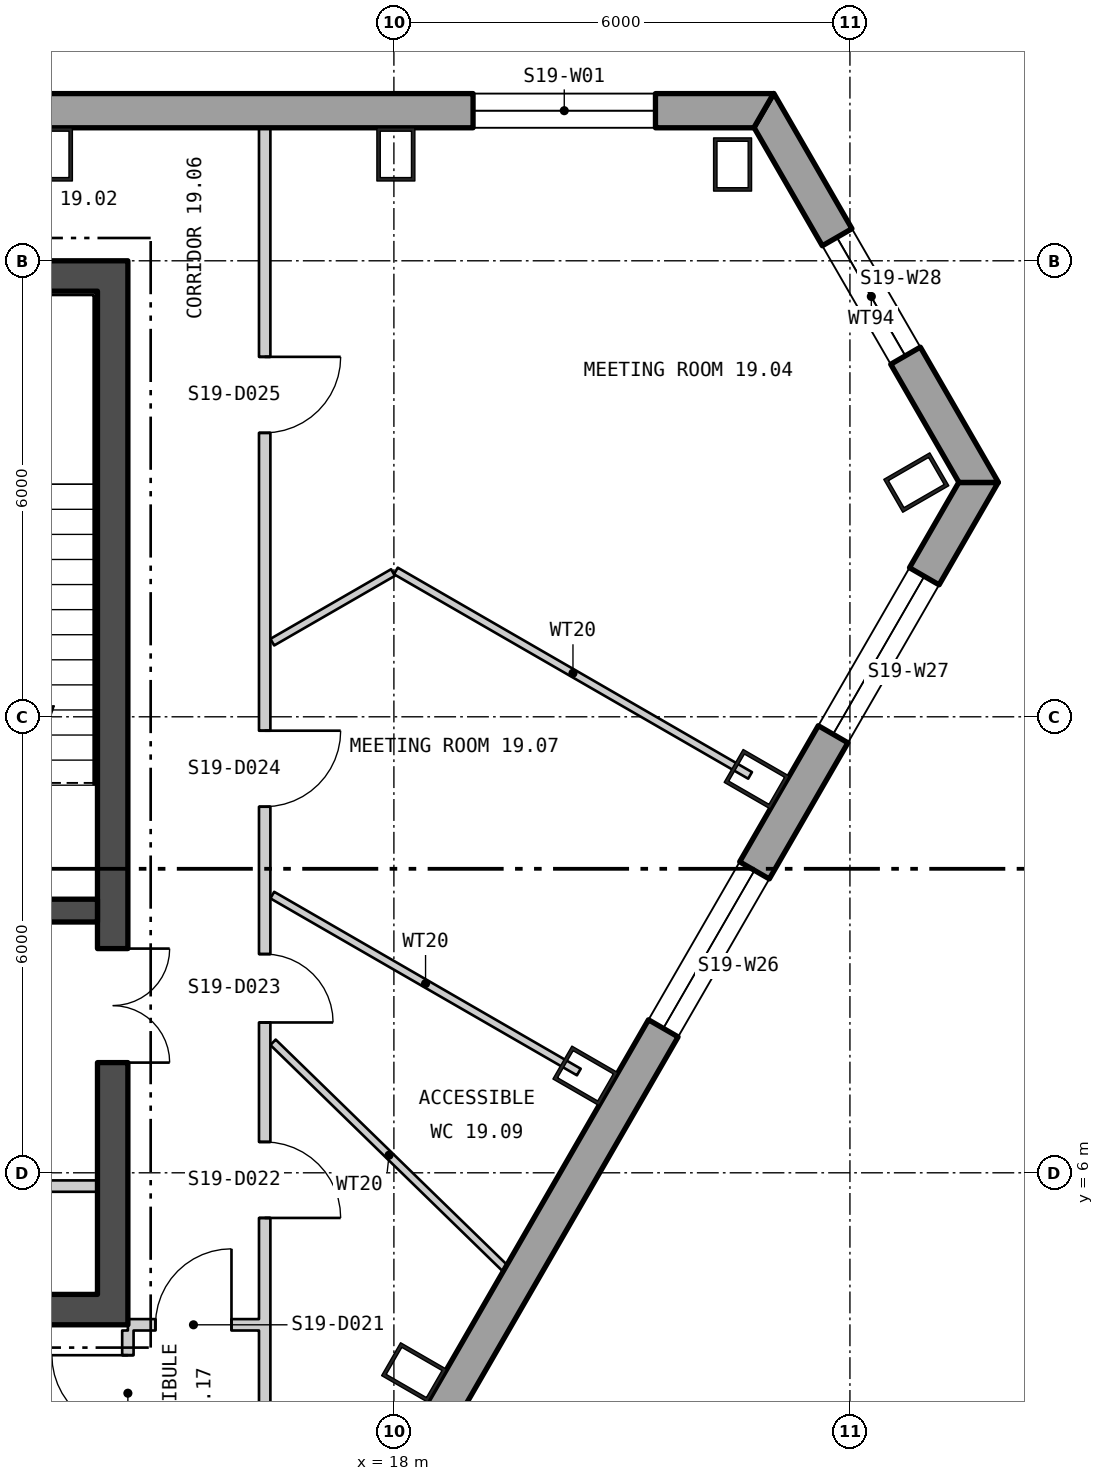
"""IFC4 building model, lengths in metres.
Left out: names, types, materials, properties, quantities, classifications, styles, units other than length and angle.
Written with IfcOpenShell. Run it as: python <this file> out.ifc"""

import sys

from ifc_helpers import new_model, si_unit, direction, frame, frame_2d, origin, origin_2d, place, context, subcontext, project, spatial, polyline, rectangle, hollow_rectangle, outline, extrude, element, fill, save


model = new_model("IFC4")
c1 = context("Model", 3, precision=1e-05, world=origin(), true_north=direction((0.0, 1.0)))
c2 = subcontext(c1, "Body", "Model", "MODEL_VIEW")
j1 = project(units=[si_unit("LENGTHUNIT", "METRE"), si_unit("PLANEANGLEUNIT", "RADIAN")], contexts=[c1])
p1 = place(None, origin())
s1 = spatial("IfcSite", under=j1, at=p1, CompositionType="ELEMENT")
p2 = place(p1, origin())
s2 = spatial("IfcBuilding", under=s1, at=p2, CompositionType="ELEMENT")
p3 = place(p2, frame((0.0, 0.0, 257.1)))
s3 = spatial("IfcBuildingStorey", under=s2, at=p3, CompositionType="ELEMENT", Elevation=257.1)
for number, where, z_axis, x_axis in (
    (1, (22.456, 19.267, 0.0), (0.0, 0.0, 1.0), (-1.0, 0.0, 0.0)),
    (2, (18.026, 19.4, 0.0), (0.0, 0.0, 1.0), (-1.0, 0.0, 0.0)),
    (3, (13.52, 19.4, 0.0), (0.0, 0.0, 1.0), (-1.0, 0.0, 0.0)),
    (4, (18.266, 3.373, 0.0), (0.0, 0.0, 1.0), (0.5, 0.866, 0.0)),
    (5, (20.52, 7.276, 0.0), (0.0, 0.0, 1.0), (0.5, 0.866, 0.0)),
    (6, (22.773, 11.179, 0.0), (0.0, 0.0, 1.0), (0.5, 0.866, 0.0)),
    (7, (24.873, 15.082, 0.0), (0.0, 0.0, 1.0), (-0.5, 0.866, 0.0)),
):
    element("IfcColumn", number, at=place(p3, frame(where, z_axis=z_axis, x_axis=x_axis)), inside=s3, PredefinedType="COLUMN", context=c2, shape_type="SweptSolid", body=[
        extrude(hollow_rectangle(XDim=0.5, YDim=0.7, WallThickness=0.045, at=origin_2d()), origin(), (0.0, 0.0, 1.0), 3.9),
    ])
p4 = place(p3, frame((22.865, 19.975, -0.4), z_axis=(0.0, 0.0, 1.0), x_axis=(-1.0, 0.0, 0.0)))
e8 = element("IfcWall", 8, at=p4, inside=s3, PredefinedType="SOLIDWALL", context=c2, shape_type="SweptSolid", body=[
    extrude(outline(polyline([(-0.13, -0.225), (45.86, -0.225), (45.6, 0.225), (0.13, 0.225), (-0.13, -0.225)])), origin(), (0.0, 0.0, 1.0), 3.9),
])
p5 = place(p4, frame((1.424, 0.0, 1.3)))
e9 = element("IfcOpeningElement", 9, at=p5, cuts=e8, PredefinedType="OPENING", context=c2, shape_type="SweptSolid", body=[
    extrude(rectangle(XDim=2.4, YDim=2.0, at=frame_2d((1.2, 1.0))), frame((0.0, 0.235, 0.0), z_axis=(0.0, -1.0, 0.0), x_axis=(1.0, 0.0, 0.0)), (0.0, 0.0, 1.0), 0.47),
])
p6 = place(p4, frame((14.905, 0.0, 1.3)))
e10 = element("IfcOpeningElement", 10, at=p6, cuts=e8, PredefinedType="OPENING", context=c2, shape_type="SweptSolid", body=[
    extrude(rectangle(XDim=2.4, YDim=2.0, at=frame_2d((1.2, 1.0))), frame((0.0, 0.235, 0.0), z_axis=(0.0, -1.0, 0.0), x_axis=(1.0, 0.0, 0.0)), (0.0, 0.0, 1.0), 0.47),
])
p7 = place(p4, frame((19.412, 0.0, 1.3)))
e11 = element("IfcOpeningElement", 11, at=p7, cuts=e8, PredefinedType="OPENING", context=c2, shape_type="SweptSolid", body=[
    extrude(rectangle(XDim=2.4, YDim=2.0, at=frame_2d((1.2, 1.0))), frame((0.0, 0.235, 0.0), z_axis=(0.0, -1.0, 0.0), x_axis=(1.0, 0.0, 0.0)), (0.0, 0.0, 1.0), 0.47),
])
p8 = place(p4, frame((23.918, 0.0, 1.3)))
e12 = element("IfcOpeningElement", 12, at=p8, cuts=e8, PredefinedType="OPENING", context=c2, shape_type="SweptSolid", body=[
    extrude(rectangle(XDim=2.4, YDim=2.0, at=frame_2d((1.2, 1.0))), frame((0.0, 0.235, 0.0), z_axis=(0.0, -1.0, 0.0), x_axis=(1.0, 0.0, 0.0)), (0.0, 0.0, 1.0), 0.47),
])
p9 = place(p4, frame((28.425, 0.0, 1.3)))
e13 = element("IfcOpeningElement", 13, at=p9, cuts=e8, PredefinedType="OPENING", context=c2, shape_type="SweptSolid", body=[
    extrude(rectangle(XDim=2.4, YDim=2.0, at=frame_2d((1.2, 1.0))), frame((0.0, 0.235, 0.0), z_axis=(0.0, -1.0, 0.0), x_axis=(1.0, 0.0, 0.0)), (0.0, 0.0, 1.0), 0.47),
])
p10 = place(p4, frame((32.932, 0.0, 1.3)))
e14 = element("IfcOpeningElement", 14, at=p10, cuts=e8, PredefinedType="OPENING", context=c2, shape_type="SweptSolid", body=[
    extrude(rectangle(XDim=2.4, YDim=2.0, at=frame_2d((1.2, 1.0))), frame((0.0, 0.235, 0.0), z_axis=(0.0, -1.0, 0.0), x_axis=(1.0, 0.0, 0.0)), (0.0, 0.0, 1.0), 0.47),
])
p11 = place(p4, frame((41.907, 0.0, 1.3)))
e15 = element("IfcOpeningElement", 15, at=p11, cuts=e8, PredefinedType="OPENING", context=c2, shape_type="SweptSolid", body=[
    extrude(rectangle(XDim=2.4, YDim=2.0, at=frame_2d((1.2, 1.0))), frame((0.0, 0.235, 0.0), z_axis=(0.0, -1.0, 0.0), x_axis=(1.0, 0.0, 0.0)), (0.0, 0.0, 1.0), 0.47),
])
p12 = place(p3, frame((2.825, -24.522, -0.18), z_axis=(0.0, 0.0, 1.0), x_axis=(0.500000141277, 0.866025322218, 0.0)))
e16 = element("IfcWall", 16, at=p12, inside=s3, PredefinedType="SOLIDWALL", context=c2, shape_type="SweptSolid", body=[
    extrude(outline(polyline([(-0.13, -0.225), (45.86, -0.225), (45.6, 0.225), (0.13, 0.225), (-0.13, -0.225)])), origin(), (0.0, 0.0, 1.0), 3.68),
])
p13 = place(p12, frame((1.424, 0.0, 1.08)))
e17 = element("IfcOpeningElement", 17, at=p13, cuts=e16, PredefinedType="OPENING", context=c2, shape_type="SweptSolid", body=[
    extrude(rectangle(XDim=2.4, YDim=2.0, at=frame_2d((1.2, 1.0))), frame((0.0, 0.235, 0.0), z_axis=(0.0, -1.0, 0.0), x_axis=(1.0, 0.0, 0.0)), (0.0, 0.0, 1.0), 0.47),
])
p14 = place(p12, frame((5.892, 0.0, 1.08)))
e18 = element("IfcOpeningElement", 18, at=p14, cuts=e16, PredefinedType="OPENING", context=c2, shape_type="SweptSolid", body=[
    extrude(rectangle(XDim=2.4, YDim=2.0, at=frame_2d((1.2, 1.0))), frame((0.0, 0.235, 0.0), z_axis=(0.0, -1.0, 0.0), x_axis=(1.0, 0.0, 0.0)), (0.0, 0.0, 1.0), 0.47),
])
p15 = place(p12, frame((10.399, 0.0, 1.08)))
e19 = element("IfcOpeningElement", 19, at=p15, cuts=e16, PredefinedType="OPENING", context=c2, shape_type="SweptSolid", body=[
    extrude(rectangle(XDim=2.4, YDim=2.0, at=frame_2d((1.2, 1.0))), frame((0.0, 0.235, 0.0), z_axis=(0.0, -1.0, 0.0), x_axis=(1.0, 0.0, 0.0)), (0.0, 0.0, 1.0), 0.47),
])
p16 = place(p12, frame((14.905, 0.0, 1.08)))
e20 = element("IfcOpeningElement", 20, at=p16, cuts=e16, PredefinedType="OPENING", context=c2, shape_type="SweptSolid", body=[
    extrude(rectangle(XDim=2.4, YDim=2.0, at=frame_2d((1.2, 1.0))), frame((0.0, 0.235, 0.0), z_axis=(0.0, -1.0, 0.0), x_axis=(1.0, 0.0, 0.0)), (0.0, 0.0, 1.0), 0.47),
])
p17 = place(p12, frame((19.412, 0.0, 1.08)))
e21 = element("IfcOpeningElement", 21, at=p17, cuts=e16, PredefinedType="OPENING", context=c2, shape_type="SweptSolid", body=[
    extrude(rectangle(XDim=2.4, YDim=2.0, at=frame_2d((1.2, 1.0))), frame((0.0, 0.235, 0.0), z_axis=(0.0, -1.0, 0.0), x_axis=(1.0, 0.0, 0.0)), (0.0, 0.0, 1.0), 0.47),
])
p18 = place(p12, frame((28.425, 0.0, 1.08)))
e22 = element("IfcOpeningElement", 22, at=p18, cuts=e16, PredefinedType="OPENING", context=c2, shape_type="SweptSolid", body=[
    extrude(rectangle(XDim=2.4, YDim=2.0, at=frame_2d((1.2, 1.0))), frame((0.0, 0.235, 0.0), z_axis=(0.0, -1.0, 0.0), x_axis=(1.0, 0.0, 0.0)), (0.0, 0.0, 1.0), 0.47),
])
p19 = place(p12, frame((37.438, 0.0, 1.08)))
e23 = element("IfcOpeningElement", 23, at=p19, cuts=e16, PredefinedType="OPENING", context=c2, shape_type="SweptSolid", body=[
    extrude(rectangle(XDim=2.4, YDim=2.0, at=frame_2d((1.2, 1.0))), frame((0.0, 0.235, 0.0), z_axis=(0.0, -1.0, 0.0), x_axis=(1.0, 0.0, 0.0)), (0.0, 0.0, 1.0), 0.47),
])
p20 = place(p12, frame((41.907, 0.0, 1.08)))
e24 = element("IfcOpeningElement", 24, at=p20, cuts=e16, PredefinedType="OPENING", context=c2, shape_type="SweptSolid", body=[
    extrude(rectangle(XDim=2.4, YDim=2.0, at=frame_2d((1.2, 1.0))), frame((0.0, 0.235, 0.0), z_axis=(0.0, -1.0, 0.0), x_axis=(1.0, 0.0, 0.0)), (0.0, 0.0, 1.0), 0.47),
])
p21 = place(p3, frame((25.694, 15.084, -0.4), z_axis=(0.0, 0.0, 1.0), x_axis=(-0.50000128263, 0.866024663256, 0.0)))
e25 = element("IfcWall", 25, at=p21, inside=s3, PredefinedType="SOLIDWALL", context=c2, shape_type="SweptSolid", body=[
    extrude(outline(polyline([(-0.13, -0.225), (5.78, -0.225), (5.52, 0.225), (0.13, 0.225), (-0.13, -0.225)])), origin(), (0.0, 0.0, 1.0), 3.9),
])
p22 = place(p21, frame((1.925, 0.0, 1.3)))
e26 = element("IfcOpeningElement", 26, at=p22, cuts=e25, PredefinedType="OPENING", context=c2, shape_type="SweptSolid", body=[
    extrude(rectangle(XDim=1.8, YDim=2.0, at=frame_2d((0.9, 1.0))), frame((0.0, 0.235, 0.0), z_axis=(0.0, -1.0, 0.0), x_axis=(1.0, 0.0, 0.0)), (0.0, 0.0, 1.0), 0.47),
])
p23 = place(p3, frame((-14.5, 4.2, 0.0), z_axis=(0.0, 0.0, 1.0), x_axis=(1.0, 0.0, 0.0)))
e27 = element("IfcWall", 27, at=p23, inside=s3, PredefinedType="SHEAR", context=c2, shape_type="SweptSolid", body=[
    extrude(rectangle(XDim=29.0, YDim=0.4, at=frame_2d((14.5, 0.0))), origin(), (0.0, 0.0, 1.0), 3.7),
])
p24 = place(p23, frame((9.0, 0.0, 0.0)))
e28 = element("IfcOpeningElement", 28, at=p24, cuts=e27, PredefinedType="OPENING", context=c2, shape_type="SweptSolid", body=[
    extrude(rectangle(XDim=1.8, YDim=2.4, at=frame_2d((0.9, 1.2))), frame((0.0, 0.21, 0.0), z_axis=(0.0, -1.0, 0.0), x_axis=(1.0, 0.0, 0.0)), (0.0, 0.0, 1.0), 0.42),
])
p25 = place(p23, frame((19.0, 0.0, 0.0)))
e29 = element("IfcOpeningElement", 29, at=p25, cuts=e27, PredefinedType="OPENING", context=c2, shape_type="SweptSolid", body=[
    extrude(rectangle(XDim=1.8, YDim=2.4, at=frame_2d((0.9, 1.2))), frame((0.0, 0.21, 0.0), z_axis=(0.0, -1.0, 0.0), x_axis=(1.0, 0.0, 0.0)), (0.0, 0.0, 1.0), 0.42),
])
p26 = place(p3, frame((-14.5, 17.8, 0.0), z_axis=(0.0, 0.0, 1.0), x_axis=(1.0, 0.0, 0.0)))
e30 = element("IfcWall", 30, at=p26, inside=s3, PredefinedType="SHEAR", context=c2, shape_type="SweptSolid", body=[
    extrude(rectangle(XDim=29.0, YDim=0.4, at=frame_2d((14.5, 0.0))), origin(), (0.0, 0.0, 1.0), 3.7),
])
p27 = place(p3, frame((14.3, 4.4, 0.0), z_axis=(0.0, 0.0, 1.0), x_axis=(0.0, 1.0, 0.0)))
e31 = element("IfcWall", 31, at=p27, inside=s3, PredefinedType="SHEAR", context=c2, shape_type="SweptSolid", body=[
    extrude(rectangle(XDim=13.2, YDim=0.4, at=frame_2d((6.6, 0.0))), origin(), (0.0, 0.0, 1.0), 3.7),
])
p28 = place(p27, frame((3.05, 0.0, 0.0)))
e32 = element("IfcOpeningElement", 32, at=p28, cuts=e31, PredefinedType="OPENING", context=c2, shape_type="SweptSolid", body=[
    extrude(rectangle(XDim=1.5, YDim=2.1, at=frame_2d((0.75, 1.05))), frame((0.0, 0.21, 0.0), z_axis=(0.0, -1.0, 0.0), x_axis=(1.0, 0.0, 0.0)), (0.0, 0.0, 1.0), 0.42),
])
p29 = place(p3, frame((11.0, 9.45, 0.0), z_axis=(0.0, 0.0, 1.0), x_axis=(1.0, 0.0, 0.0)))
e33 = element("IfcWall", 33, at=p29, inside=s3, PredefinedType="SHEAR", context=c2, shape_type="SweptSolid", body=[
    extrude(rectangle(XDim=3.1, YDim=0.3, at=frame_2d((1.55, 0.0))), origin(), (0.0, 0.0, 1.0), 3.7),
])
p30 = place(p29, frame((0.95, 0.0, 0.0)))
e34 = element("IfcOpeningElement", 34, at=p30, cuts=e33, PredefinedType="OPENING", context=c2, shape_type="SweptSolid", body=[
    extrude(rectangle(XDim=1.2, YDim=2.1, at=frame_2d((0.6, 1.05))), frame((0.0, 0.16, 0.0), z_axis=(0.0, -1.0, 0.0), x_axis=(1.0, 0.0, 0.0)), (0.0, 0.0, 1.0), 0.32),
])
p31 = place(p3, frame((11.0, 5.825, 0.0), z_axis=(0.0, 0.0, 1.0), x_axis=(1.0, 0.0, 0.0)))
e35 = element("IfcWall", 35, at=p31, inside=s3, PredefinedType="PARTITIONING", context=c2, shape_type="SweptSolid", body=[
    extrude(rectangle(XDim=3.1, YDim=0.15, at=frame_2d((1.55, 0.0))), origin(), (0.0, 0.0, 1.0), 3.7),
])
p32 = place(p3, frame((14.5, 2.275, 0.0), z_axis=(0.0, 0.0, 1.0), x_axis=(0.0, 1.0, 0.0)))
e36 = element("IfcWall", 36, at=p32, inside=s3, PredefinedType="PARTITIONING", context=c2, shape_type="SweptSolid", body=[
    extrude(rectangle(XDim=1.65, YDim=0.15, at=frame_2d((0.825, 0.0))), origin(), (0.0, 0.0, 1.0), 3.7),
])
p33 = place(p32, frame((0.325, 0.0, 0.0)))
e37 = element("IfcOpeningElement", 37, at=p33, cuts=e36, PredefinedType="OPENING", context=c2, shape_type="SweptSolid", body=[
    extrude(rectangle(XDim=1.0, YDim=2.1, at=frame_2d((0.5, 1.05))), frame((0.0, 0.085, 0.0), z_axis=(0.0, -1.0, 0.0), x_axis=(1.0, 0.0, 0.0)), (0.0, 0.0, 1.0), 0.17),
])
p34 = place(p3, frame((14.5, 4.0, 0.0), z_axis=(0.0, 0.0, 1.0), x_axis=(1.0, 0.0, 0.0)))
e38 = element("IfcWall", 38, at=p34, inside=s3, PredefinedType="PARTITIONING", context=c2, shape_type="SweptSolid", body=[
    extrude(rectangle(XDim=1.725, YDim=0.15, at=frame_2d((0.863, 0.0))), origin(), (0.0, 0.0, 1.0), 3.16),
])
p35 = place(p34, frame((0.363, 0.0, 0.0)))
e39 = element("IfcOpeningElement", 39, at=p35, cuts=e38, PredefinedType="OPENING", context=c2, shape_type="SweptSolid", body=[
    extrude(rectangle(XDim=1.0, YDim=2.1, at=frame_2d((0.5, 1.05))), frame((0.0, 0.085, 0.0), z_axis=(0.0, -1.0, 0.0), x_axis=(1.0, 0.0, 0.0)), (0.0, 0.0, 1.0), 0.17),
])
p36 = place(p3, frame((16.3, 2.125, 0.0), z_axis=(0.0, 0.0, 1.0), x_axis=(0.0, 1.0, 0.0)))
e40 = element("IfcWall", 40, at=p36, inside=s3, PredefinedType="PARTITIONING", context=c2, shape_type="SweptSolid", body=[
    extrude(rectangle(XDim=17.622, YDim=0.15, at=frame_2d((8.811, 0.0))), origin(), (0.0, 0.0, 1.0), 3.7),
])
p37 = place(p36, frame((3.281, 0.0, 0.0)))
e41 = element("IfcOpeningElement", 41, at=p37, cuts=e40, PredefinedType="OPENING", context=c2, shape_type="SweptSolid", body=[
    extrude(rectangle(XDim=1.0, YDim=2.1, at=frame_2d((0.5, 1.05))), frame((0.0, 0.085, 0.0), z_axis=(0.0, -1.0, 0.0), x_axis=(1.0, 0.0, 0.0)), (0.0, 0.0, 1.0), 0.17),
])
p38 = place(p36, frame((5.853, 0.0, 0.0)))
e42 = element("IfcOpeningElement", 42, at=p38, cuts=e40, PredefinedType="OPENING", context=c2, shape_type="SweptSolid", body=[
    extrude(rectangle(XDim=0.9, YDim=2.1, at=frame_2d((0.45, 1.05))), frame((0.0, 0.085, 0.0), z_axis=(0.0, -1.0, 0.0), x_axis=(1.0, 0.0, 0.0)), (0.0, 0.0, 1.0), 0.17),
])
p39 = place(p36, frame((8.692, 0.0, 0.0)))
e43 = element("IfcOpeningElement", 43, at=p39, cuts=e40, PredefinedType="OPENING", context=c2, shape_type="SweptSolid", body=[
    extrude(rectangle(XDim=1.0, YDim=2.1, at=frame_2d((0.5, 1.05))), frame((0.0, 0.085, 0.0), z_axis=(0.0, -1.0, 0.0), x_axis=(1.0, 0.0, 0.0)), (0.0, 0.0, 1.0), 0.17),
])
p40 = place(p36, frame((13.611, 0.0, 0.0)))
e44 = element("IfcOpeningElement", 44, at=p40, cuts=e40, PredefinedType="OPENING", context=c2, shape_type="SweptSolid", body=[
    extrude(rectangle(XDim=1.0, YDim=2.1, at=frame_2d((0.5, 1.05))), frame((0.0, 0.085, 0.0), z_axis=(0.0, -1.0, 0.0), x_axis=(1.0, 0.0, 0.0)), (0.0, 0.0, 1.0), 0.17),
])
p41 = place(p3, frame((16.4, 12.982, 0.0), z_axis=(0.0, 0.0, 1.0), x_axis=(0.866221908719, 0.499659488908, 0.0)))
e45 = element("IfcWall", 45, at=p41, inside=s3, PredefinedType="PARTITIONING", context=c2, shape_type="SweptSolid", body=[
    extrude(rectangle(XDim=1.833, YDim=0.1, at=frame_2d((0.917, 0.0))), origin(), (0.0, 0.0, 1.0), 3.7),
])
p42 = place(p3, frame((16.4, 9.654, 0.0), z_axis=(0.0, 0.0, 1.0), x_axis=(0.86606758311, -0.499926936147, 0.0)))
e46 = element("IfcWall", 46, at=p42, inside=s3, PredefinedType="PARTITIONING", context=c2, shape_type="SweptSolid", body=[
    extrude(rectangle(XDim=4.657, YDim=0.1, at=frame_2d((2.328, 0.0))), origin(), (0.0, 0.0, 1.0), 3.7),
])
p43 = place(p3, frame((16.41, 7.717, 0.0), z_axis=(0.0, 0.0, 1.0), x_axis=(0.716434135664, -0.697654734991, 0.0)))
e47 = element("IfcWall", 47, at=p43, inside=s3, PredefinedType="PARTITIONING", context=c2, shape_type="SweptSolid", body=[
    extrude(rectangle(XDim=4.26, YDim=0.1, at=frame_2d((2.13, 0.0))), origin(), (0.0, 0.0, 1.0), 3.7),
])
p44 = place(p3, frame((18.026, 13.919, 0.0), z_axis=(0.0, 0.0, 1.0), x_axis=(0.866061796884, -0.499936960004, 0.0)))
e48 = element("IfcWall", 48, at=p44, inside=s3, PredefinedType="PARTITIONING", context=c2, shape_type="SweptSolid", body=[
    extrude(rectangle(XDim=5.381, YDim=0.1, at=frame_2d((2.69, 0.0))), origin(), (0.0, 0.0, 1.0), 3.7),
])
p45 = place(p5, origin())
e49 = element("IfcWindow", 49, at=p45, inside=s3, PartitioningType="SINGLE_PANEL", PredefinedType="WINDOW", context=c2, shape_type="SweptSolid", body=[
    extrude(rectangle(XDim=2.4, YDim=2.0, at=frame_2d((1.2, 1.0))), frame((0.0, 0.105, 0.0), z_axis=(0.0, -1.0, 0.0), x_axis=(1.0, 0.0, 0.0)), (0.0, 0.0, 1.0), 0.06),
])
fill(e9, e49)
p46 = place(p19, origin())
e50 = element("IfcWindow", 50, at=p46, inside=s3, PartitioningType="SINGLE_PANEL", PredefinedType="WINDOW", context=c2, shape_type="SweptSolid", body=[
    extrude(rectangle(XDim=2.4, YDim=2.0, at=frame_2d((1.2, 1.0))), frame((0.0, 0.105, 0.0), z_axis=(0.0, -1.0, 0.0), x_axis=(1.0, 0.0, 0.0)), (0.0, 0.0, 1.0), 0.06),
])
fill(e23, e50)
p47 = place(p20, origin())
e51 = element("IfcWindow", 51, at=p47, inside=s3, PartitioningType="SINGLE_PANEL", PredefinedType="WINDOW", context=c2, shape_type="SweptSolid", body=[
    extrude(rectangle(XDim=2.4, YDim=2.0, at=frame_2d((1.2, 1.0))), frame((0.0, 0.105, 0.0), z_axis=(0.0, -1.0, 0.0), x_axis=(1.0, 0.0, 0.0)), (0.0, 0.0, 1.0), 0.06),
])
fill(e24, e51)
p48 = place(p22, origin())
e52 = element("IfcWindow", 52, at=p48, inside=s3, PartitioningType="SINGLE_PANEL", PredefinedType="WINDOW", context=c2, shape_type="SweptSolid", body=[
    extrude(rectangle(XDim=1.8, YDim=2.0, at=frame_2d((0.9, 1.0))), frame((0.0, 0.105, 0.0), z_axis=(0.0, -1.0, 0.0), x_axis=(1.0, 0.0, 0.0)), (0.0, 0.0, 1.0), 0.06),
])
fill(e26, e52)
p49 = place(p28, origin())
e53 = element("IfcDoor", 53, at=p49, inside=s3, OperationType="DOUBLE_DOOR_SINGLE_SWING", PredefinedType="DOOR", context=c2, shape_type="SweptSolid", body=[
    extrude(rectangle(XDim=1.5, YDim=2.1, at=frame_2d((0.75, 1.05))), frame((0.0, 0.025, 0.0), z_axis=(0.0, -1.0, 0.0), x_axis=(1.0, 0.0, 0.0)), (0.0, 0.0, 1.0), 0.05),
])
fill(e32, e53)
p50 = place(p33, origin())
e54 = element("IfcDoor", 54, at=p50, inside=s3, OperationType="SINGLE_SWING_LEFT", PredefinedType="DOOR", context=c2, shape_type="SweptSolid", body=[
    extrude(rectangle(XDim=1.0, YDim=2.1, at=frame_2d((0.5, 1.05))), frame((0.0, 0.025, 0.0), z_axis=(0.0, -1.0, 0.0), x_axis=(1.0, 0.0, 0.0)), (0.0, 0.0, 1.0), 0.05),
])
fill(e37, e54)
p51 = place(p35, origin())
e55 = element("IfcDoor", 55, at=p51, inside=s3, OperationType="SINGLE_SWING_LEFT", PredefinedType="DOOR", context=c2, shape_type="SweptSolid", body=[
    extrude(rectangle(XDim=1.0, YDim=2.1, at=frame_2d((0.5, 1.05))), frame((0.0, 0.025, 0.0), z_axis=(0.0, -1.0, 0.0), x_axis=(1.0, 0.0, 0.0)), (0.0, 0.0, 1.0), 0.05),
])
fill(e39, e55)
p52 = place(p37, origin())
e56 = element("IfcDoor", 56, at=p52, inside=s3, OperationType="SINGLE_SWING_LEFT", PredefinedType="DOOR", context=c2, shape_type="SweptSolid", body=[
    extrude(rectangle(XDim=1.0, YDim=2.1, at=frame_2d((0.5, 1.05))), frame((0.0, 0.025, 0.0), z_axis=(0.0, -1.0, 0.0), x_axis=(1.0, 0.0, 0.0)), (0.0, 0.0, 1.0), 0.05),
])
fill(e41, e56)
p53 = place(p38, origin())
e57 = element("IfcDoor", 57, at=p53, inside=s3, OperationType="SINGLE_SWING_LEFT", PredefinedType="DOOR", context=c2, shape_type="SweptSolid", body=[
    extrude(rectangle(XDim=0.9, YDim=2.1, at=frame_2d((0.45, 1.05))), frame((0.0, 0.025, 0.0), z_axis=(0.0, -1.0, 0.0), x_axis=(1.0, 0.0, 0.0)), (0.0, 0.0, 1.0), 0.05),
])
fill(e42, e57)
p54 = place(p39, origin())
e58 = element("IfcDoor", 58, at=p54, inside=s3, OperationType="SINGLE_SWING_RIGHT", PredefinedType="DOOR", context=c2, shape_type="SweptSolid", body=[
    extrude(rectangle(XDim=1.0, YDim=2.1, at=frame_2d((0.5, 1.05))), frame((0.0, 0.025, 0.0), z_axis=(0.0, -1.0, 0.0), x_axis=(1.0, 0.0, 0.0)), (0.0, 0.0, 1.0), 0.05),
])
fill(e43, e58)
p55 = place(p40, origin())
e59 = element("IfcDoor", 59, at=p55, inside=s3, OperationType="SINGLE_SWING_RIGHT", PredefinedType="DOOR", context=c2, shape_type="SweptSolid", body=[
    extrude(rectangle(XDim=1.0, YDim=2.1, at=frame_2d((0.5, 1.05))), frame((0.0, 0.025, 0.0), z_axis=(0.0, -1.0, 0.0), x_axis=(1.0, 0.0, 0.0)), (0.0, 0.0, 1.0), 0.05),
])
fill(e44, e59)
save(model, sys.argv[1])
